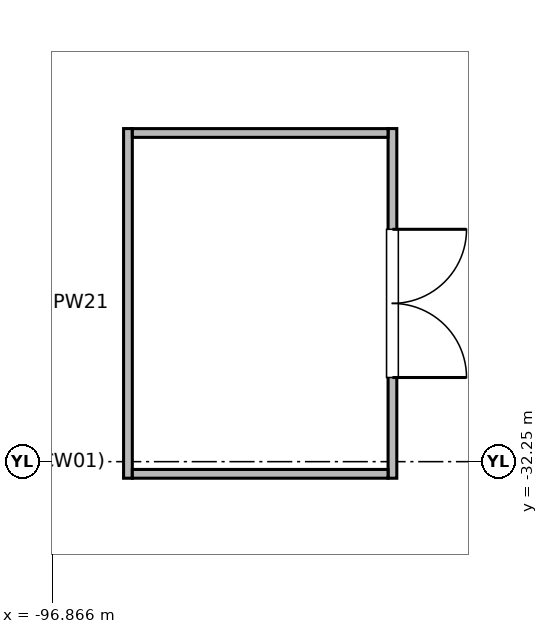
"""IFC4 building model, lengths in metres.
Left out: names, types, materials, properties, quantities, classifications, styles, units other than length and angle.
Written with IfcOpenShell. Run it as: python <this file> out.ifc"""

import sys

from ifc_helpers import new_model, si_unit, direction, frame, frame_2d, origin, place, context, subcontext, project, spatial, rectangle, extrude, element, fill, save


model = new_model("IFC4")
c1 = context("Model", 3, precision=1e-05, world=origin(), true_north=direction((0.0, 1.0)))
c2 = subcontext(c1, "Body", "Model", "MODEL_VIEW")
j1 = project(units=[si_unit("LENGTHUNIT", "METRE"), si_unit("PLANEANGLEUNIT", "RADIAN")], contexts=[c1])
p1 = place(None, origin())
s1 = spatial("IfcSite", under=j1, at=p1, CompositionType="ELEMENT")
p2 = place(p1, origin())
s2 = spatial("IfcBuilding", under=s1, at=p2, CompositionType="ELEMENT")
p3 = place(p2, frame((0.0, 0.0, 6.0)))
s3 = spatial("IfcBuildingStorey", under=s2, at=p3, CompositionType="ELEMENT", Elevation=6.0)
p4 = place(p3, frame((-92.387, -27.868, 0.0), z_axis=(0.0, 0.0, 1.0), x_axis=(0.0, -1.0, 0.0)))
e1 = element("IfcWall", 1, at=p4, inside=s3, PredefinedType="PARTITIONING", context=c2, shape_type="SweptSolid", body=[
    extrude(rectangle(XDim=4.6, YDim=0.115, at=frame_2d((2.3, 0.0))), origin(), (0.0, 0.0, 1.0), 4.42),
])
p5 = place(p4, frame((1.325, 0.0, 0.0)))
e2 = element("IfcOpeningElement", 2, at=p5, cuts=e1, PredefinedType="OPENING", context=c2, shape_type="SweptSolid", body=[
    extrude(rectangle(XDim=1.95, YDim=2.35, at=frame_2d((0.975, 1.175))), frame((0.0, 0.067, 0.0), z_axis=(0.0, -1.0, 0.0), x_axis=(1.0, 0.0, 0.0)), (0.0, 0.0, 1.0), 0.135),
])
p6 = place(p3, frame((-95.867, -32.468, 0.0), z_axis=(0.0, 0.0, 1.0), x_axis=(0.0, 1.0, 0.0)))
e3 = element("IfcWall", 3, at=p6, inside=s3, PredefinedType="PARTITIONING", context=c2, shape_type="SweptSolid", body=[
    extrude(rectangle(XDim=4.6, YDim=0.115, at=frame_2d((2.3, 0.0))), origin(), (0.0, 0.0, 1.0), 4.42),
])
for number, where, z_axis, x_axis in (
    (4, (-95.809, -32.41, 0.0), (0.0, 0.0, 1.0), (1.0, 0.0, 0.0)),
    (5, (-95.809, -27.926, 0.0), (0.0, 0.0, 1.0), (1.0, 0.0, 0.0)),
):
    element("IfcWall", number, at=place(p3, frame(where, z_axis=z_axis, x_axis=x_axis)), inside=s3, PredefinedType="PARTITIONING", context=c2, shape_type="SweptSolid", body=[
        extrude(rectangle(XDim=3.364, YDim=0.115, at=frame_2d((1.682, 0.0))), origin(), (0.0, 0.0, 1.0), 4.42),
    ])
p7 = place(p5, origin())
e6 = element("IfcDoor", 6, at=p7, inside=s3, OperationType="DOUBLE_DOOR_SINGLE_SWING", PredefinedType="DOOR", context=c2, shape_type="SweptSolid", body=[
    extrude(rectangle(XDim=1.95, YDim=2.35, at=frame_2d((0.975, 1.175))), frame((0.0, 0.025, 0.0), z_axis=(0.0, -1.0, 0.0), x_axis=(1.0, 0.0, 0.0)), (0.0, 0.0, 1.0), 0.05),
])
fill(e2, e6)
save(model, sys.argv[1])
